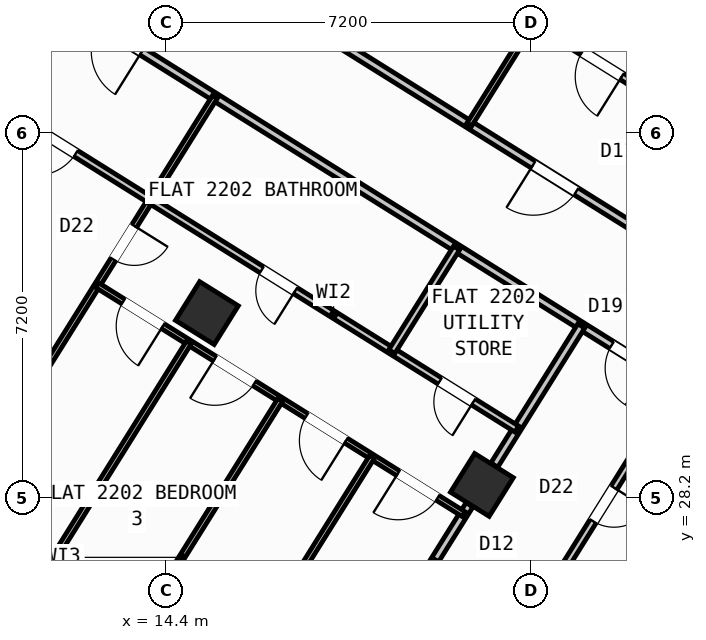
"""IFC4 building model, lengths in metres.
Left out: names, types, materials, properties, quantities, classifications, styles, units other than length and angle.
Written with IfcOpenShell. Run it as: python <this file> out.ifc"""

import sys

from ifc_helpers import new_model, si_unit, direction, frame, frame_2d, origin, origin_2d, place, context, subcontext, project, spatial, rectangle, hollow_rectangle, extrude, source, transform, mapped, element, fill, save


model = new_model("IFC4")
c1 = context("Model", 3, precision=1e-05, world=origin(), true_north=direction((0.0, 1.0)))
c2 = subcontext(c1, "Body", "Model", "MODEL_VIEW")
j1 = project(units=[si_unit("LENGTHUNIT", "METRE"), si_unit("PLANEANGLEUNIT", "RADIAN")], contexts=[c1])
p1 = place(None, origin())
s1 = spatial("IfcSite", under=j1, at=p1, CompositionType="ELEMENT")
p2 = place(p1, origin())
s2 = spatial("IfcBuilding", under=s1, at=p2, CompositionType="ELEMENT")
p3 = place(p2, frame((0.0, 0.0, 90.0)))
s3 = spatial("IfcBuildingStorey", under=s2, at=p3, CompositionType="ELEMENT", Elevation=90.0)
m1 = source(origin(), c2, "Body", "SweptSolid", [
    extrude(hollow_rectangle(XDim=0.9, YDim=0.9, WallThickness=0.036, at=origin_2d()), origin(), (0.0, 0.0, 1.0), 3.6),
])
for number, where, z_axis, x_axis in (
    (1, (20.632, 28.452, 0.0), (0.0, 0.0, 1.0), (-0.848, 0.53, 0.0)),
    (2, (15.205, 31.844, 0.0), (0.0, 0.0, 1.0), (-0.848, 0.53, 0.0)),
):
    element("IfcColumn", number, at=place(p3, frame(where, z_axis=z_axis, x_axis=x_axis)), inside=s3, PredefinedType="COLUMN", context=c2, shape_type="MappedRepresentation", body=[
        mapped(m1, transform((0.0, 0.0, 0.0), scale=1.0)),
    ])
p4 = place(p3, frame((31.76, 12.183, 0.0), z_axis=(0.0, 0.0, 1.0), x_axis=(-0.848047074256, 0.529920899612, 0.0)))
e3 = element("IfcWall", 3, at=p4, inside=s3, PredefinedType="STANDARD", context=c2, shape_type="SweptSolid", body=[
    extrude(rectangle(XDim=30.652, YDim=0.32, at=frame_2d((15.326, 0.0))), origin(), (0.0, 0.0, 1.0), 3.35),
])
p5 = place(p4, frame((15.153, 0.0, 0.0)))
e4 = element("IfcOpeningElement", 4, at=p5, cuts=e3, PredefinedType="OPENING", context=c2, shape_type="SweptSolid", body=[
    extrude(rectangle(XDim=1.2, YDim=2.15, at=frame_2d((0.6, 1.075))), frame((0.0, 0.17, 0.0), z_axis=(0.0, -1.0, 0.0), x_axis=(1.0, 0.0, 0.0)), (0.0, 0.0, 1.0), 0.34),
])
p6 = place(p4, frame((2.002, 0.0, 0.8)))
e5 = element("IfcOpeningElement", 5, at=p6, cuts=e3, PredefinedType="OPENING", context=c2, shape_type="SweptSolid", body=[
    extrude(rectangle(XDim=2.1, YDim=1.55, at=frame_2d((1.05, 0.775))), frame((0.0, 0.17, 0.0), z_axis=(0.0, -1.0, 0.0), x_axis=(1.0, 0.0, 0.0)), (0.0, 0.0, 1.0), 0.34),
])
p7 = place(p4, frame((7.206, 0.0, 0.8)))
e6 = element("IfcOpeningElement", 6, at=p7, cuts=e3, PredefinedType="OPENING", context=c2, shape_type="SweptSolid", body=[
    extrude(rectangle(XDim=2.1, YDim=1.55, at=frame_2d((1.05, 0.775))), frame((0.0, 0.17, 0.0), z_axis=(0.0, -1.0, 0.0), x_axis=(1.0, 0.0, 0.0)), (0.0, 0.0, 1.0), 0.34),
])
p8 = place(p4, frame((12.648, 0.0, 1.0)))
e7 = element("IfcOpeningElement", 7, at=p8, cuts=e3, PredefinedType="OPENING", context=c2, shape_type="SweptSolid", body=[
    extrude(rectangle(XDim=0.9, YDim=1.25, at=frame_2d((0.45, 0.625))), frame((0.0, 0.17, 0.0), z_axis=(0.0, -1.0, 0.0), x_axis=(1.0, 0.0, 0.0)), (0.0, 0.0, 1.0), 0.34),
])
p9 = place(p4, frame((27.974, 0.0, 0.95)))
e8 = element("IfcOpeningElement", 8, at=p9, cuts=e3, PredefinedType="OPENING", context=c2, shape_type="SweptSolid", body=[
    extrude(rectangle(XDim=1.2, YDim=1.4, at=frame_2d((0.6, 0.7))), frame((0.0, 0.17, 0.0), z_axis=(0.0, -1.0, 0.0), x_axis=(1.0, 0.0, 0.0)), (0.0, 0.0, 1.0), 0.34),
])
p10 = place(p4, frame((18.347, 0.0, 1.0)))
e9 = element("IfcOpeningElement", 9, at=p10, cuts=e3, PredefinedType="OPENING", context=c2, shape_type="SweptSolid", body=[
    extrude(rectangle(XDim=0.9, YDim=1.25, at=frame_2d((0.45, 0.625))), frame((0.0, 0.17, 0.0), z_axis=(0.0, -1.0, 0.0), x_axis=(1.0, 0.0, 0.0)), (0.0, 0.0, 1.0), 0.34),
])
p11 = place(p4, frame((20.931, 0.0, 1.0)))
e10 = element("IfcOpeningElement", 10, at=p11, cuts=e3, PredefinedType="OPENING", context=c2, shape_type="SweptSolid", body=[
    extrude(rectangle(XDim=0.65, YDim=1.15, at=frame_2d((0.325, 0.575))), frame((0.0, 0.17, 0.0), z_axis=(0.0, -1.0, 0.0), x_axis=(1.0, 0.0, 0.0)), (0.0, 0.0, 1.0), 0.34),
])
p12 = place(p4, frame((22.938, 0.0, 1.0)))
e11 = element("IfcOpeningElement", 11, at=p12, cuts=e3, PredefinedType="OPENING", context=c2, shape_type="SweptSolid", body=[
    extrude(rectangle(XDim=0.9, YDim=1.25, at=frame_2d((0.45, 0.625))), frame((0.0, 0.17, 0.0), z_axis=(0.0, -1.0, 0.0), x_axis=(1.0, 0.0, 0.0)), (0.0, 0.0, 1.0), 0.34),
])
p13 = place(p4, frame((25.069, 0.0, 1.0)))
e12 = element("IfcOpeningElement", 12, at=p13, cuts=e3, PredefinedType="OPENING", context=c2, shape_type="SweptSolid", body=[
    extrude(rectangle(XDim=0.9, YDim=1.25, at=frame_2d((0.45, 0.625))), frame((0.0, 0.17, 0.0), z_axis=(0.0, -1.0, 0.0), x_axis=(1.0, 0.0, 0.0)), (0.0, 0.0, 1.0), 0.34),
])
p14 = place(p3, frame((5.7, 28.71, 0.0), z_axis=(0.0, 0.0, 1.0), x_axis=(0.529923711467, 0.8480453172, 0.0)))
e13 = element("IfcWall", 13, at=p14, inside=s3, PredefinedType="STANDARD", context=c2, shape_type="SweptSolid", body=[
    extrude(rectangle(XDim=21.587, YDim=0.32, at=frame_2d((10.794, 0.0))), origin(), (0.0, 0.0, 1.0), 2.775),
])
p15 = place(p14, frame((2.994, 0.0, 0.8)))
e14 = element("IfcOpeningElement", 14, at=p15, cuts=e13, PredefinedType="OPENING", context=c2, shape_type="SweptSolid", body=[
    extrude(rectangle(XDim=2.1, YDim=1.55, at=frame_2d((1.05, 0.775))), frame((0.0, 0.17, 0.0), z_axis=(0.0, -1.0, 0.0), x_axis=(1.0, 0.0, 0.0)), (0.0, 0.0, 1.0), 0.34),
])
p16 = place(p14, frame((9.739, 0.0, 1.0)))
e15 = element("IfcOpeningElement", 15, at=p16, cuts=e13, PredefinedType="OPENING", context=c2, shape_type="SweptSolid", body=[
    extrude(rectangle(XDim=0.9, YDim=1.25, at=frame_2d((0.45, 0.625))), frame((0.0, 0.17, 0.0), z_axis=(0.0, -1.0, 0.0), x_axis=(1.0, 0.0, 0.0)), (0.0, 0.0, 1.0), 0.34),
])
p17 = place(p14, frame((18.476, 0.0, 1.0)))
e16 = element("IfcOpeningElement", 16, at=p17, cuts=e13, PredefinedType="OPENING", context=c2, shape_type="SweptSolid", body=[
    extrude(rectangle(XDim=0.9, YDim=1.25, at=frame_2d((0.45, 0.625))), frame((0.0, 0.17, 0.0), z_axis=(0.0, -1.0, 0.0), x_axis=(1.0, 0.0, 0.0)), (0.0, 0.0, 1.0), 0.34),
])
p18 = place(p3, frame((17.424, 47.083, 0.0), z_axis=(0.0, 0.0, 1.0), x_axis=(0.848049927979, -0.529916332693, 0.0)))
e17 = element("IfcWall", 17, at=p18, inside=s3, PredefinedType="STANDARD", context=c2, shape_type="SweptSolid", body=[
    extrude(rectangle(XDim=29.223, YDim=0.32, at=frame_2d((14.612, 0.0))), origin(), (0.0, 0.0, 1.0), 3.35),
])
p19 = place(p18, frame((15.02, 0.0, 0.0)))
e18 = element("IfcOpeningElement", 18, at=p19, cuts=e17, PredefinedType="OPENING", context=c2, shape_type="SweptSolid", body=[
    extrude(rectangle(XDim=1.05, YDim=2.15, at=frame_2d((0.525, 1.075))), frame((0.0, 0.17, 0.0), z_axis=(0.0, -1.0, 0.0), x_axis=(1.0, 0.0, 0.0)), (0.0, 0.0, 1.0), 0.34),
])
p20 = place(p18, frame((20.869, 0.0, 0.8)))
e19 = element("IfcOpeningElement", 19, at=p20, cuts=e17, PredefinedType="OPENING", context=c2, shape_type="SweptSolid", body=[
    extrude(rectangle(XDim=2.1, YDim=1.55, at=frame_2d((1.05, 0.775))), frame((0.0, 0.17, 0.0), z_axis=(0.0, -1.0, 0.0), x_axis=(1.0, 0.0, 0.0)), (0.0, 0.0, 1.0), 0.34),
])
p21 = place(p18, frame((25.438, 0.0, 0.8)))
e20 = element("IfcOpeningElement", 20, at=p21, cuts=e17, PredefinedType="OPENING", context=c2, shape_type="SweptSolid", body=[
    extrude(rectangle(XDim=2.1, YDim=1.55, at=frame_2d((1.05, 0.775))), frame((0.0, 0.17, 0.0), z_axis=(0.0, -1.0, 0.0), x_axis=(1.0, 0.0, 0.0)), (0.0, 0.0, 1.0), 0.34),
])
p22 = place(p18, frame((10.481, 0.0, 1.0)))
e21 = element("IfcOpeningElement", 21, at=p22, cuts=e17, PredefinedType="OPENING", context=c2, shape_type="SweptSolid", body=[
    extrude(rectangle(XDim=0.9, YDim=1.25, at=frame_2d((0.45, 0.625))), frame((0.0, 0.17, 0.0), z_axis=(0.0, -1.0, 0.0), x_axis=(1.0, 0.0, 0.0)), (0.0, 0.0, 1.0), 0.34),
])
p23 = place(p18, frame((6.674, 0.0, 1.0)))
e22 = element("IfcOpeningElement", 22, at=p23, cuts=e17, PredefinedType="OPENING", context=c2, shape_type="SweptSolid", body=[
    extrude(rectangle(XDim=0.9, YDim=1.25, at=frame_2d((0.45, 0.625))), frame((0.0, 0.17, 0.0), z_axis=(0.0, -1.0, 0.0), x_axis=(1.0, 0.0, 0.0)), (0.0, 0.0, 1.0), 0.34),
])
p24 = place(p18, frame((3.694, 0.0, 1.0)))
e23 = element("IfcOpeningElement", 23, at=p24, cuts=e17, PredefinedType="OPENING", context=c2, shape_type="SweptSolid", body=[
    extrude(rectangle(XDim=0.9, YDim=1.25, at=frame_2d((0.45, 0.625))), frame((0.0, 0.17, 0.0), z_axis=(0.0, -1.0, 0.0), x_axis=(1.0, 0.0, 0.0)), (0.0, 0.0, 1.0), 0.34),
])
p25 = place(p3, frame((25.807, 29.582, 0.0), z_axis=(0.0, 0.0, 1.0), x_axis=(-0.529920357077, -0.848047413271, 0.0)))
e24 = element("IfcWall", 24, at=p25, inside=s3, PredefinedType="PARTITIONING", context=c2, shape_type="SweptSolid", body=[
    extrude(rectangle(XDim=11.45, YDim=0.16, at=frame_2d((5.725, 0.0))), origin(), (0.0, 0.0, 1.0), 3.34),
])
p26 = place(p3, frame((26.973, 31.447, 0.0), z_axis=(0.0, 0.0, 1.0), x_axis=(-0.848048310262, 0.529918921593, 0.0)))
e25 = element("IfcWall", 25, at=p26, inside=s3, PredefinedType="PARTITIONING", context=c2, shape_type="SweptSolid", body=[
    extrude(rectangle(XDim=16.73, YDim=0.16, at=frame_2d((8.365, 0.0))), origin(), (0.0, 0.0, 1.0), 3.34),
])
p27 = place(p26, frame((2.22, 0.0, 0.0)))
e26 = element("IfcOpeningElement", 26, at=p27, cuts=e25, PredefinedType="OPENING", context=c2, shape_type="SweptSolid", body=[
    extrude(rectangle(XDim=0.86, YDim=2.05, at=frame_2d((0.43, 1.025))), frame((0.0, 0.09, 0.0), z_axis=(0.0, -1.0, 0.0), x_axis=(1.0, 0.0, 0.0)), (0.0, 0.0, 1.0), 0.18),
])
p28 = place(p26, frame((5.28, 0.0, 0.0)))
e27 = element("IfcOpeningElement", 27, at=p28, cuts=e25, PredefinedType="OPENING", context=c2, shape_type="SweptSolid", body=[
    extrude(rectangle(XDim=1.0, YDim=2.1, at=frame_2d((0.5, 1.05))), frame((0.0, 0.09, 0.0), z_axis=(0.0, -1.0, 0.0), x_axis=(1.0, 0.0, 0.0)), (0.0, 0.0, 1.0), 0.18),
])
p29 = place(p3, frame((25.807, 29.582, 0.0), z_axis=(0.0, 0.0, 1.0), x_axis=(-0.848052408131, 0.529912363569, 0.0)))
e28 = element("IfcWall", 28, at=p29, inside=s3, PredefinedType="PARTITIONING", context=c2, shape_type="SweptSolid", body=[
    extrude(rectangle(XDim=16.73, YDim=0.16, at=frame_2d((8.365, 0.0))), origin(), (0.0, 0.0, 1.0), 3.34),
])
p30 = place(p29, frame((2.22, 0.0, 0.0)))
e29 = element("IfcOpeningElement", 29, at=p30, cuts=e28, PredefinedType="OPENING", context=c2, shape_type="SweptSolid", body=[
    extrude(rectangle(XDim=0.86, YDim=2.05, at=frame_2d((0.43, 1.025))), frame((0.0, 0.09, 0.0), z_axis=(0.0, -1.0, 0.0), x_axis=(1.0, 0.0, 0.0)), (0.0, 0.0, 1.0), 0.18),
])
p31 = place(p29, frame((14.013, 0.0, 0.0)))
e30 = element("IfcOpeningElement", 30, at=p31, cuts=e28, PredefinedType="OPENING", context=c2, shape_type="SweptSolid", body=[
    extrude(rectangle(XDim=1.0, YDim=2.1, at=frame_2d((0.5, 1.05))), frame((0.0, 0.09, 0.0), z_axis=(0.0, -1.0, 0.0), x_axis=(1.0, 0.0, 0.0)), (0.0, 0.0, 1.0), 0.18),
])
p32 = place(p3, frame((22.593, 31.59, 0.0), z_axis=(0.0, 0.0, 1.0), x_axis=(-0.529924383291, -0.848044897393, 0.0)))
e31 = element("IfcWall", 31, at=p32, inside=s3, PredefinedType="PARTITIONING", context=c2, shape_type="SweptSolid", body=[
    extrude(rectangle(XDim=3.238, YDim=0.16, at=frame_2d((1.619, 0.0))), origin(), (0.0, 0.0, 1.0), 2.775),
])
p33 = place(p3, frame((20.387, 28.06, 0.0), z_axis=(0.0, 0.0, 1.0), x_axis=(-0.529902564924, -0.848058530814, 0.0)))
e32 = element("IfcWall", 32, at=p33, inside=s3, PredefinedType="PARTITIONING", context=c2, shape_type="SweptSolid", body=[
    extrude(rectangle(XDim=6.376, YDim=0.16, at=frame_2d((3.188, 0.0))), origin(), (0.0, 0.0, 1.0), 2.775),
])
p34 = place(p3, frame((24.492, 30.403, 0.0), z_axis=(0.0, 0.0, 1.0), x_axis=(-0.529919283494, -0.848048084121, 0.0)))
e33 = element("IfcWall", 33, at=p34, inside=s3, PredefinedType="PLUMBINGWALL", context=c2, shape_type="SweptSolid", body=[
    extrude(rectangle(XDim=5.51, YDim=0.14, at=frame_2d((2.755, 0.0))), origin(), (0.0, 0.0, 1.0), 2.995),
])
p35 = place(p34, frame((2.365, 0.0, 0.0)))
e34 = element("IfcOpeningElement", 34, at=p35, cuts=e33, PredefinedType="OPENING", context=c2, shape_type="SweptSolid", body=[
    extrude(rectangle(XDim=0.78, YDim=2.05, at=frame_2d((0.39, 1.025))), frame((0.0, 0.08, 0.0), z_axis=(0.0, -1.0, 0.0), x_axis=(1.0, 0.0, 0.0)), (0.0, 0.0, 1.0), 0.16),
])
p36 = place(p3, frame((15.361, 36.108, 0.0), z_axis=(0.0, 0.0, 1.0), x_axis=(-0.529912802348, -0.848052133956, 0.0)))
e35 = element("IfcWall", 35, at=p36, inside=s3, PredefinedType="PARTITIONING", context=c2, shape_type="SweptSolid", body=[
    extrude(rectangle(XDim=11.72, YDim=0.11, at=frame_2d((5.86, 0.0))), origin(), (0.0, 0.0, 1.0), 2.995),
])
p37 = place(p36, frame((3.0, 0.0, 0.0)))
e36 = element("IfcOpeningElement", 36, at=p37, cuts=e35, PredefinedType="OPENING", context=c2, shape_type="SweptSolid", body=[
    extrude(rectangle(XDim=0.78, YDim=2.05, at=frame_2d((0.39, 1.025))), frame((0.0, 0.065, 0.0), z_axis=(0.0, -1.0, 0.0), x_axis=(1.0, 0.0, 0.0)), (0.0, 0.0, 1.0), 0.13),
])
p38 = place(p3, frame((14.09, 34.073, 0.0), z_axis=(0.0, 0.0, 1.0), x_axis=(-0.848045135007, 0.529924003034, 0.0)))
e37 = element("IfcWall", 37, at=p38, inside=s3, PredefinedType="PLUMBINGWALL", context=c2, shape_type="SweptSolid", body=[
    extrude(rectangle(XDim=4.393, YDim=0.14, at=frame_2d((2.196, 0.0))), origin(), (0.0, 0.0, 1.0), 3.34),
])
p39 = place(p38, frame((1.737, 0.0, 0.0)))
e38 = element("IfcOpeningElement", 38, at=p39, cuts=e37, PredefinedType="OPENING", context=c2, shape_type="SweptSolid", body=[
    extrude(rectangle(XDim=0.92, YDim=2.08, at=frame_2d((0.46, 1.04))), frame((0.0, 0.08, 0.0), z_axis=(0.0, -1.0, 0.0), x_axis=(1.0, 0.0, 0.0)), (0.0, 0.0, 1.0), 0.16),
])
p40 = place(p3, frame((21.321, 29.554, 0.0), z_axis=(0.0, 0.0, 1.0), x_axis=(-0.84803529765, 0.529939745575, 0.0)))
e39 = element("IfcWall", 39, at=p40, inside=s3, PredefinedType="PLUMBINGWALL", context=c2, shape_type="SweptSolid", body=[
    extrude(rectangle(XDim=8.527, YDim=0.14, at=frame_2d((4.264, 0.0))), origin(), (0.0, 0.0, 1.0), 3.34),
])
p41 = place(p40, frame((5.155, 0.0, 0.0)))
e40 = element("IfcOpeningElement", 40, at=p41, cuts=e39, PredefinedType="OPENING", context=c2, shape_type="SweptSolid", body=[
    extrude(rectangle(XDim=0.78, YDim=2.05, at=frame_2d((0.39, 1.025))), frame((0.0, 0.08, 0.0), z_axis=(0.0, -1.0, 0.0), x_axis=(1.0, 0.0, 0.0)), (0.0, 0.0, 1.0), 0.16),
])
p42 = place(p40, frame((1.011, 0.0, 0.0)))
e41 = element("IfcOpeningElement", 41, at=p42, cuts=e39, PredefinedType="OPENING", context=c2, shape_type="SweptSolid", body=[
    extrude(rectangle(XDim=0.78, YDim=2.05, at=frame_2d((0.39, 1.025))), frame((0.0, 0.08, 0.0), z_axis=(0.0, -1.0, 0.0), x_axis=(1.0, 0.0, 0.0)), (0.0, 0.0, 1.0), 0.16),
])
p43 = place(p3, frame((20.132, 33.128, 0.0), z_axis=(0.0, 0.0, 1.0), x_axis=(-0.529935194983, -0.848038141311, 0.0)))
e42 = element("IfcWall", 42, at=p43, inside=s3, PredefinedType="PLUMBINGWALL", context=c2, shape_type="SweptSolid", body=[
    extrude(rectangle(XDim=2.41, YDim=0.14, at=frame_2d((1.205, 0.0))), origin(), (0.0, 0.0, 1.0), 3.34),
])
p44 = place(p3, frame((20.272, 27.875, 0.0), z_axis=(0.0, 0.0, 1.0), x_axis=(-0.848056204746, 0.529906287557, 0.0)))
e43 = element("IfcWall", 43, at=p44, inside=s3, PredefinedType="PARTITIONING", context=c2, shape_type="SweptSolid", body=[
    extrude(rectangle(XDim=8.527, YDim=0.11, at=frame_2d((4.264, 0.0))), origin(), (0.0, 0.0, 1.0), 3.34),
])
p45 = place(p44, frame((0.606, 0.0, 0.0)))
e44 = element("IfcOpeningElement", 44, at=p45, cuts=e43, PredefinedType="OPENING", context=c2, shape_type="SweptSolid", body=[
    extrude(rectangle(XDim=0.92, YDim=2.08, at=frame_2d((0.46, 1.04))), frame((0.0, 0.065, 0.0), z_axis=(0.0, -1.0, 0.0), x_axis=(1.0, 0.0, 0.0)), (0.0, 0.0, 1.0), 0.13),
])
p46 = place(p44, frame((2.738, 0.0, 0.0)))
e45 = element("IfcOpeningElement", 45, at=p46, cuts=e43, PredefinedType="OPENING", context=c2, shape_type="SweptSolid", body=[
    extrude(rectangle(XDim=0.92, YDim=2.08, at=frame_2d((0.46, 1.04))), frame((0.0, 0.065, 0.0), z_axis=(0.0, -1.0, 0.0), x_axis=(1.0, 0.0, 0.0)), (0.0, 0.0, 1.0), 0.13),
])
p47 = place(p44, frame((4.869, 0.0, 0.0)))
e46 = element("IfcOpeningElement", 46, at=p47, cuts=e43, PredefinedType="OPENING", context=c2, shape_type="SweptSolid", body=[
    extrude(rectangle(XDim=0.92, YDim=2.08, at=frame_2d((0.46, 1.04))), frame((0.0, 0.065, 0.0), z_axis=(0.0, -1.0, 0.0), x_axis=(1.0, 0.0, 0.0)), (0.0, 0.0, 1.0), 0.13),
])
p48 = place(p44, frame((7.001, 0.0, 0.0)))
e47 = element("IfcOpeningElement", 47, at=p48, cuts=e43, PredefinedType="OPENING", context=c2, shape_type="SweptSolid", body=[
    extrude(rectangle(XDim=0.92, YDim=2.08, at=frame_2d((0.46, 1.04))), frame((0.0, 0.065, 0.0), z_axis=(0.0, -1.0, 0.0), x_axis=(1.0, 0.0, 0.0)), (0.0, 0.0, 1.0), 0.13),
])
for number, where, z_axis, x_axis in (
    (48, (18.464, 29.005, 0.0), (0.0, 0.0, 1.0), (-0.53, -0.848, 0.0)),
    (49, (16.656, 30.135, 0.0), (0.0, 0.0, 1.0), (-0.53, -0.848, 0.0)),
):
    element("IfcWall", number, at=place(p3, frame(where, z_axis=z_axis, x_axis=x_axis)), inside=s3, PredefinedType="PARTITIONING", context=c2, shape_type="SweptSolid", body=[
        extrude(rectangle(XDim=7.34, YDim=0.11, at=frame_2d((3.67, 0.0))), origin(), (0.0, 0.0, 1.0), 2.995),
    ])
p49 = place(p3, frame((14.848, 31.264, 0.0), z_axis=(0.0, 0.0, 1.0), x_axis=(-0.529920534869, -0.848047302174, 0.0)))
e50 = element("IfcWall", 50, at=p49, inside=s3, PredefinedType="PARTITIONING", context=c2, shape_type="SweptSolid", body=[
    extrude(rectangle(XDim=6.158, YDim=0.11, at=frame_2d((3.079, 0.0))), origin(), (0.0, 0.0, 1.0), 2.775),
])
p50 = place(p3, frame((24.792, 42.62, 0.0), z_axis=(0.0, 0.0, 1.0), x_axis=(-0.529925083182, -0.848044460046, 0.0)))
e51 = element("IfcWall", 51, at=p50, inside=s3, PredefinedType="PARTITIONING", context=c2, shape_type="SweptSolid", body=[
    extrude(rectangle(XDim=8.32, YDim=0.11, at=frame_2d((4.16, 0.0))), origin(), (0.0, 0.0, 1.0), 3.34),
])
p51 = place(p50, frame((4.65, 0.0, 0.0)))
e52 = element("IfcOpeningElement", 52, at=p51, cuts=e51, PredefinedType="OPENING", context=c2, shape_type="SweptSolid", body=[
    extrude(rectangle(XDim=0.78, YDim=2.05, at=frame_2d((0.39, 1.025))), frame((0.0, 0.065, 0.0), z_axis=(0.0, -1.0, 0.0), x_axis=(1.0, 0.0, 0.0)), (0.0, 0.0, 1.0), 0.13),
])
p52 = place(p3, frame((25.03, 35.491, 0.0), z_axis=(0.0, 0.0, 1.0), x_axis=(-0.848070667369, 0.52988314103, 0.0)))
e53 = element("IfcWall", 53, at=p52, inside=s3, PredefinedType="PLUMBINGWALL", context=c2, shape_type="SweptSolid", body=[
    extrude(rectangle(XDim=3.98, YDim=0.14, at=frame_2d((1.99, 0.0))), origin(), (0.0, 0.0, 1.0), 3.34),
])
p53 = place(p52, frame((1.93, 0.0, 0.0)))
e54 = element("IfcOpeningElement", 54, at=p53, cuts=e53, PredefinedType="OPENING", context=c2, shape_type="SweptSolid", body=[
    extrude(rectangle(XDim=0.92, YDim=2.08, at=frame_2d((0.46, 1.04))), frame((0.0, 0.08, 0.0), z_axis=(0.0, -1.0, 0.0), x_axis=(1.0, 0.0, 0.0)), (0.0, 0.0, 1.0), 0.16),
])
m2 = source(origin(), c2, "Body", "SweptSolid", [
    extrude(rectangle(XDim=0.86, YDim=2.05, at=frame_2d((0.43, 1.025))), frame((0.0, 0.025, 0.0), z_axis=(0.0, -1.0, 0.0), x_axis=(1.0, 0.0, 0.0)), (0.0, 0.0, 1.0), 0.05),
])
p54 = place(p30, origin())
e55 = element("IfcDoor", 55, at=p54, inside=s3, OperationType="SINGLE_SWING_LEFT", PredefinedType="DOOR", context=c2, shape_type="MappedRepresentation", body=[
    mapped(m2, transform((0.0, 0.0, 0.0), scale=1.0)),
])
fill(e29, e55)
m3 = source(origin(), c2, "Body", "SweptSolid", [
    extrude(rectangle(XDim=0.78, YDim=2.05, at=frame_2d((0.39, 1.025))), frame((0.0, 0.025, 0.0), z_axis=(0.0, -1.0, 0.0), x_axis=(1.0, 0.0, 0.0)), (0.0, 0.0, 1.0), 0.05),
])
p55 = place(p35, origin())
e56 = element("IfcDoor", 56, at=p55, inside=s3, OperationType="SINGLE_SWING_LEFT", PredefinedType="DOOR", context=c2, shape_type="MappedRepresentation", body=[
    mapped(m3, transform((0.0, 0.0, 0.0), scale=1.0)),
])
fill(e34, e56)
m4 = source(origin(), c2, "Body", "SweptSolid", [
    extrude(rectangle(XDim=1.0, YDim=2.1, at=frame_2d((0.5, 1.05))), frame((0.0, 0.025, 0.0), z_axis=(0.0, -1.0, 0.0), x_axis=(1.0, 0.0, 0.0)), (0.0, 0.0, 1.0), 0.05),
])
p56 = place(p31, origin())
e57 = element("IfcDoor", 57, at=p56, inside=s3, OperationType="SINGLE_SWING_LEFT", PredefinedType="DOOR", context=c2, shape_type="MappedRepresentation", body=[
    mapped(m4, transform((0.0, 0.0, 0.0), scale=1.0)),
])
fill(e30, e57)
m5 = source(origin(), c2, "Body", "SweptSolid", [
    extrude(rectangle(XDim=0.92, YDim=2.08, at=frame_2d((0.46, 1.04))), frame((0.0, 0.025, 0.0), z_axis=(0.0, -1.0, 0.0), x_axis=(1.0, 0.0, 0.0)), (0.0, 0.0, 1.0), 0.05),
])
p57 = place(p39, origin())
e58 = element("IfcDoor", 58, at=p57, inside=s3, OperationType="SINGLE_SWING_RIGHT", PredefinedType="DOOR", context=c2, shape_type="MappedRepresentation", body=[
    mapped(m5, transform((0.0, 0.0, 0.0), scale=1.0)),
])
fill(e38, e58)
p58 = place(p37, origin())
e59 = element("IfcDoor", 59, at=p58, inside=s3, OperationType="SINGLE_SWING_LEFT", PredefinedType="DOOR", context=c2, shape_type="MappedRepresentation", body=[
    mapped(m3, transform((0.0, 0.0, 0.0), scale=1.0)),
])
fill(e36, e59)
p59 = place(p41, origin())
e60 = element("IfcDoor", 60, at=p59, inside=s3, OperationType="SINGLE_SWING_LEFT", PredefinedType="DOOR", context=c2, shape_type="MappedRepresentation", body=[
    mapped(m3, transform((0.0, 0.0, 0.0), scale=1.0)),
])
fill(e40, e60)
p60 = place(p42, origin())
e61 = element("IfcDoor", 61, at=p60, inside=s3, OperationType="SINGLE_SWING_LEFT", PredefinedType="DOOR", context=c2, shape_type="MappedRepresentation", body=[
    mapped(m3, transform((0.0, 0.0, 0.0), scale=1.0)),
])
fill(e41, e61)
p61 = place(p45, origin())
e62 = element("IfcDoor", 62, at=p61, inside=s3, OperationType="SINGLE_SWING_RIGHT", PredefinedType="DOOR", context=c2, shape_type="MappedRepresentation", body=[
    mapped(m5, transform((0.0, 0.0, 0.0), scale=1.0)),
])
fill(e44, e62)
p62 = place(p46, origin())
e63 = element("IfcDoor", 63, at=p62, inside=s3, OperationType="SINGLE_SWING_LEFT", PredefinedType="DOOR", context=c2, shape_type="MappedRepresentation", body=[
    mapped(m5, transform((0.0, 0.0, 0.0), scale=1.0)),
])
fill(e45, e63)
p63 = place(p47, origin())
e64 = element("IfcDoor", 64, at=p63, inside=s3, OperationType="SINGLE_SWING_RIGHT", PredefinedType="DOOR", context=c2, shape_type="MappedRepresentation", body=[
    mapped(m5, transform((0.0, 0.0, 0.0), scale=1.0)),
])
fill(e46, e64)
p64 = place(p48, origin())
e65 = element("IfcDoor", 65, at=p64, inside=s3, OperationType="SINGLE_SWING_LEFT", PredefinedType="DOOR", context=c2, shape_type="MappedRepresentation", body=[
    mapped(m5, transform((0.0, 0.0, 0.0), scale=1.0)),
])
fill(e47, e65)
p65 = place(p28, origin())
e66 = element("IfcDoor", 66, at=p65, inside=s3, OperationType="SINGLE_SWING_RIGHT", PredefinedType="DOOR", context=c2, shape_type="MappedRepresentation", body=[
    mapped(m4, transform((0.0, 0.0, 0.0), scale=1.0)),
])
fill(e27, e66)
p66 = place(p53, origin())
e67 = element("IfcDoor", 67, at=p66, inside=s3, OperationType="SINGLE_SWING_LEFT", PredefinedType="DOOR", context=c2, shape_type="MappedRepresentation", body=[
    mapped(m5, transform((0.0, 0.0, 0.0), scale=1.0)),
])
fill(e54, e67)
save(model, sys.argv[1])
